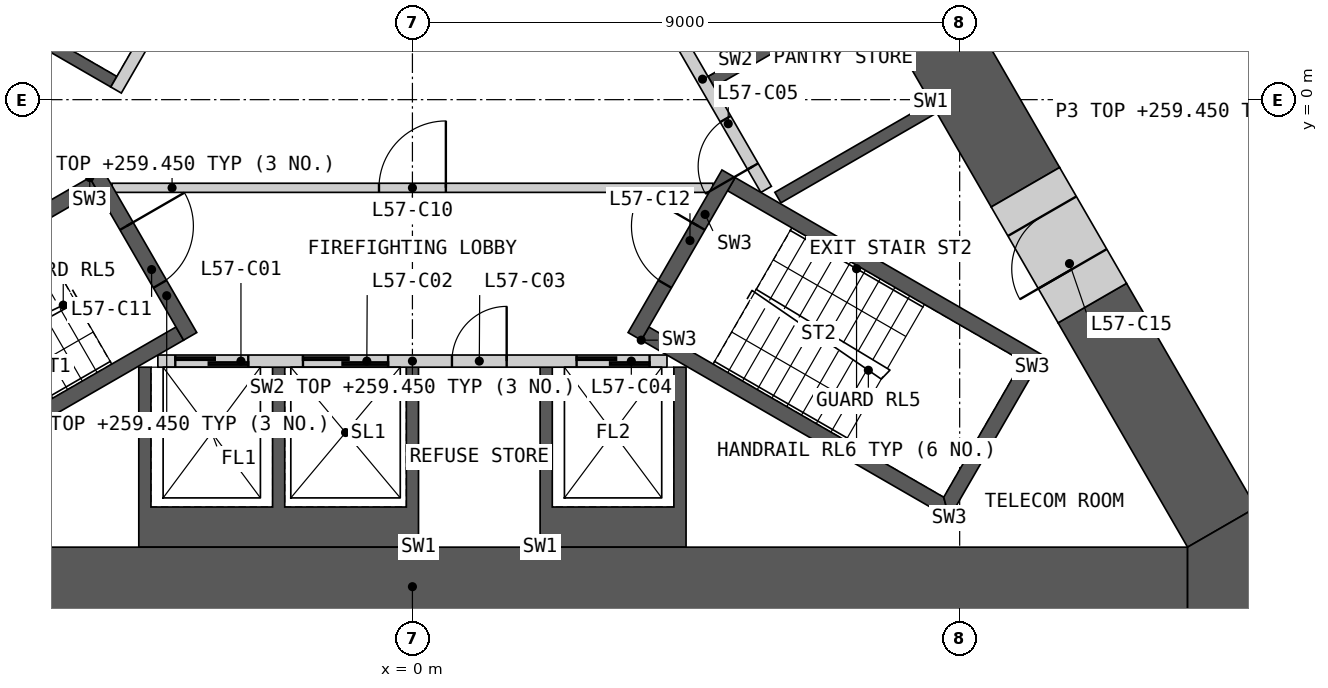
"""IFC4 building model, lengths in metres.
Left out: names, types, materials, properties, quantities, classifications, styles, units other than length and angle.
Written with IfcOpenShell. Run it as: python <this file> out.ifc"""

import sys

from ifc_helpers import new_model, si_unit, direction, frame, frame_2d, origin, place, context, subcontext, project, spatial, polyline, rectangle, outline, extrude, element, fill, save


model = new_model("IFC4")
c1 = context("Model", 3, precision=1e-05, world=origin(), true_north=direction((0.0, 1.0)))
c2 = subcontext(c1, "Body", "Model", "MODEL_VIEW")
j1 = project(units=[si_unit("LENGTHUNIT", "METRE"), si_unit("PLANEANGLEUNIT", "RADIAN")], contexts=[c1])
p1 = place(None, origin())
s1 = spatial("IfcSite", under=j1, at=p1, CompositionType="ELEMENT")
p2 = place(p1, origin())
s2 = spatial("IfcBuilding", under=s1, at=p2, CompositionType="ELEMENT")
p3 = place(p2, frame((0.0, 0.0, 256.2)))
s3 = spatial("IfcBuildingStorey", under=s2, at=p3, CompositionType="ELEMENT", Elevation=256.2)
p4 = place(p3, origin())
e1 = element("IfcWall", 1, at=p4, inside=s3, PredefinedType="SHEAR", context=c2, shape_type="SweptSolid", body=[
    extrude(outline(polyline([(0.1, -7.36), (-4.5, -7.36), (-4.5, -4.4), (-4.3, -4.4), (-4.3, -6.7), (-2.3, -6.7), (-2.3, -4.4), (-2.1, -4.4), (-2.1, -6.7), (-0.1, -6.7), (-0.1, -4.4), (0.1, -4.4), (0.1, -7.36)])), origin(), (0.0, 0.0, 1.0), 3.25),
])
p5 = place(p3, origin())
e2 = element("IfcWall", 2, at=p5, inside=s3, PredefinedType="SHEAR", context=c2, shape_type="SweptSolid", body=[
    extrude(outline(polyline([(2.1, -7.36), (2.1, -4.4), (2.3, -4.4), (2.3, -6.7), (4.3, -6.7), (4.3, -4.4), (4.5, -4.4), (4.5, -7.36), (2.1, -7.36)])), origin(), (0.0, 0.0, 1.0), 3.25),
])
p6 = place(p3, frame((-4.187, -4.3, 0.0), z_axis=(0.0, 0.0, 1.0), x_axis=(1.0, 0.0, 0.0)))
e3 = element("IfcWall", 3, at=p6, inside=s3, PredefinedType="SOLIDWALL", context=c2, shape_type="SweptSolid", body=[
    extrude(rectangle(XDim=8.373, YDim=0.2, at=frame_2d((4.187, 0.0))), origin(), (0.0, 0.0, 1.0), 3.25),
])
p7 = place(p6, frame((0.287, 0.0, 0.0)))
e4 = element("IfcOpeningElement", 4, at=p7, cuts=e3, PredefinedType="OPENING", context=c2, shape_type="SweptSolid", body=[
    extrude(rectangle(XDim=1.2, YDim=2.1, at=frame_2d((0.6, 1.05))), frame((0.0, 0.11, 0.0), z_axis=(0.0, -1.0, 0.0), x_axis=(1.0, 0.0, 0.0)), (0.0, 0.0, 1.0), 0.22),
])
p8 = place(p6, frame((2.387, 0.0, 0.0)))
e5 = element("IfcOpeningElement", 5, at=p8, cuts=e3, PredefinedType="OPENING", context=c2, shape_type="SweptSolid", body=[
    extrude(rectangle(XDim=1.4, YDim=2.1, at=frame_2d((0.7, 1.05))), frame((0.0, 0.11, 0.0), z_axis=(0.0, -1.0, 0.0), x_axis=(1.0, 0.0, 0.0)), (0.0, 0.0, 1.0), 0.22),
])
p9 = place(p6, frame((4.837, 0.0, 0.0)))
e6 = element("IfcOpeningElement", 6, at=p9, cuts=e3, PredefinedType="OPENING", context=c2, shape_type="SweptSolid", body=[
    extrude(rectangle(XDim=0.9, YDim=2.1, at=frame_2d((0.45, 1.05))), frame((0.0, 0.11, 0.0), z_axis=(0.0, -1.0, 0.0), x_axis=(1.0, 0.0, 0.0)), (0.0, 0.0, 1.0), 0.22),
])
p10 = place(p6, frame((6.887, 0.0, 0.0)))
e7 = element("IfcOpeningElement", 7, at=p10, cuts=e3, PredefinedType="OPENING", context=c2, shape_type="SweptSolid", body=[
    extrude(rectangle(XDim=1.2, YDim=2.1, at=frame_2d((0.6, 1.05))), frame((0.0, 0.11, 0.0), z_axis=(0.0, -1.0, 0.0), x_axis=(1.0, 0.0, 0.0)), (0.0, 0.0, 1.0), 0.22),
])
p11 = place(p3, origin())
e8 = element("IfcWall", 8, at=p11, inside=s3, PredefinedType="SHEAR", context=c2, shape_type="SweptSolid", body=[
    extrude(outline(polyline([(8.524, -0.044), (8.624, -0.217), (8.231, -0.444), (6.061, -1.697), (5.96, -1.524), (8.131, -0.271), (8.524, -0.044)])), origin(), (0.0, 0.0, 1.0), 3.25),
])
p12 = place(p3, origin())
e9 = element("IfcWall", 9, at=p12, inside=s3, PredefinedType="SHEAR", context=c2, shape_type="SweptSolid", body=[
    extrude(outline(polyline([(7.524, 1.688), (7.131, 1.461), (4.96, 0.208), (4.861, 0.381), (6.852, 1.531), (4.752, 5.169), (2.76, 4.019), (2.66, 4.192), (4.652, 5.342), (3.652, 7.074), (1.66, 5.924), (1.561, 6.097), (3.731, 7.35), (4.124, 7.577), (7.524, 1.688)])), origin(), (0.0, 0.0, 1.0), 3.25),
])
p13 = place(p3, frame((5.817, -1.476, 0.0), z_axis=(0.0, 0.0, 1.0), x_axis=(-0.500002616675, 0.866023893041, 0.0)))
e10 = element("IfcWall", 10, at=p13, inside=s3, PredefinedType="SOLIDWALL", context=c2, shape_type="SweptSolid", body=[
    extrude(rectangle(XDim=8.373, YDim=0.2, at=frame_2d((4.187, 0.0))), origin(), (0.0, 0.0, 1.0), 3.25),
])
p14 = place(p13, frame((0.437, 0.0, 0.0)))
e11 = element("IfcOpeningElement", 11, at=p14, cuts=e10, PredefinedType="OPENING", context=c2, shape_type="SweptSolid", body=[
    extrude(rectangle(XDim=0.9, YDim=2.1, at=frame_2d((0.45, 1.05))), frame((0.0, 0.11, 0.0), z_axis=(0.0, -1.0, 0.0), x_axis=(1.0, 0.0, 0.0)), (0.0, 0.0, 1.0), 0.22),
])
p15 = place(p13, frame((3.737, 0.0, 0.0)))
e12 = element("IfcOpeningElement", 12, at=p15, cuts=e10, PredefinedType="OPENING", context=c2, shape_type="SweptSolid", body=[
    extrude(rectangle(XDim=0.9, YDim=2.1, at=frame_2d((0.45, 1.05))), frame((0.0, 0.11, 0.0), z_axis=(0.0, -1.0, 0.0), x_axis=(1.0, 0.0, 0.0)), (0.0, 0.0, 1.0), 0.22),
])
p16 = place(p13, frame((6.937, 0.0, 0.0)))
e13 = element("IfcOpeningElement", 13, at=p16, cuts=e10, PredefinedType="OPENING", context=c2, shape_type="SweptSolid", body=[
    extrude(rectangle(XDim=1.1, YDim=2.1, at=frame_2d((0.55, 1.05))), frame((0.0, 0.11, 0.0), z_axis=(0.0, -1.0, 0.0), x_axis=(1.0, 0.0, 0.0)), (0.0, 0.0, 1.0), 0.22),
])
p17 = place(p3, origin())
e14 = element("IfcWall", 14, at=p17, inside=s3, PredefinedType="SHEAR", context=c2, shape_type="SweptSolid", body=[
    extrude(outline(polyline([(-7.524, 1.688), (-4.124, 7.577), (-3.731, 7.35), (-1.561, 6.097), (-1.66, 5.924), (-3.652, 7.074), (-4.652, 5.342), (-2.66, 4.192), (-2.76, 4.019), (-4.752, 5.169), (-5.752, 3.437), (-3.76, 2.287), (-3.861, 2.113), (-5.852, 3.263), (-6.852, 1.531), (-4.861, 0.381), (-4.96, 0.208), (-7.131, 1.461), (-7.524, 1.688)])), origin(), (0.0, 0.0, 1.0), 3.25),
])
p18 = place(p3, frame((-1.631, 5.776, 0.0), z_axis=(0.0, 0.0, 1.0), x_axis=(-0.499992876559, -0.866029516466, 0.0)))
e15 = element("IfcWall", 15, at=p18, inside=s3, PredefinedType="SOLIDWALL", context=c2, shape_type="SweptSolid", body=[
    extrude(rectangle(XDim=6.486, YDim=0.2, at=frame_2d((3.243, 0.0))), origin(), (0.0, 0.0, 1.0), 3.25),
])
p19 = place(p18, frame((0.337, 0.0, 0.0)))
e16 = element("IfcOpeningElement", 16, at=p19, cuts=e15, PredefinedType="OPENING", context=c2, shape_type="SweptSolid", body=[
    extrude(rectangle(XDim=1.1, YDim=2.1, at=frame_2d((0.55, 1.05))), frame((0.0, 0.11, 0.0), z_axis=(0.0, -1.0, 0.0), x_axis=(1.0, 0.0, 0.0)), (0.0, 0.0, 1.0), 0.22),
])
p20 = place(p18, frame((2.537, 0.0, 0.0)))
e17 = element("IfcOpeningElement", 17, at=p20, cuts=e15, PredefinedType="OPENING", context=c2, shape_type="SweptSolid", body=[
    extrude(rectangle(XDim=1.1, YDim=2.1, at=frame_2d((0.55, 1.05))), frame((0.0, 0.11, 0.0), z_axis=(0.0, -1.0, 0.0), x_axis=(1.0, 0.0, 0.0)), (0.0, 0.0, 1.0), 0.22),
])
p21 = place(p3, frame((-4.941, -1.45, 0.0), z_axis=(0.0, 0.0, 1.0), x_axis=(1.0, 0.0, 0.0)))
e18 = element("IfcWall", 18, at=p21, inside=s3, PredefinedType="PARTITIONING", context=c2, shape_type="SweptSolid", body=[
    extrude(rectangle(XDim=9.882, YDim=0.15, at=frame_2d((4.941, 0.0))), origin(), (0.0, 0.0, 1.0), 3.25),
])
p22 = place(p21, frame((4.391, 0.0, 0.0)))
e19 = element("IfcOpeningElement", 19, at=p22, cuts=e18, PredefinedType="OPENING", context=c2, shape_type="SweptSolid", body=[
    extrude(rectangle(XDim=1.1, YDim=2.1, at=frame_2d((0.55, 1.05))), frame((0.0, 0.085, 0.0), z_axis=(0.0, -1.0, 0.0), x_axis=(1.0, 0.0, 0.0)), (0.0, 0.0, 1.0), 0.17),
])
p23 = place(p3, origin())
e20 = element("IfcWall", 20, at=p23, inside=s3, PredefinedType="SHEAR", context=c2, shape_type="SweptSolid", body=[
    extrude(outline(polyline([(-5.307, -1.281), (-10.374, -4.206), (-10.032, -4.298), (-5.182, -1.498), (-5.307, -1.281)])), origin(), (0.0, 0.0, 1.0), 3.25),
])
p24 = place(p3, origin())
e21 = element("IfcWall", 21, at=p24, inside=s3, PredefinedType="SHEAR", context=c2, shape_type="SweptSolid", body=[
    extrude(outline(polyline([(-8.738, -6.539), (-8.83, -6.881), (-3.763, -3.956), (-3.888, -3.739), (-8.738, -6.539)])), origin(), (0.0, 0.0, 1.0), 3.25),
])
p25 = place(p3, frame((-5.199, -1.219, 0.0), z_axis=(0.0, 0.0, 1.0), x_axis=(0.499982516597, -0.866035497597, 0.0)))
e22 = element("IfcWall", 22, at=p25, inside=s3, PredefinedType="SHEAR", context=c2, shape_type="SweptSolid", body=[
    extrude(rectangle(XDim=3.088, YDim=0.25, at=frame_2d((1.544, 0.0))), origin(), (0.0, 0.0, 1.0), 3.25),
])
p26 = place(p25, frame((0.994, 0.0, 0.0)))
e23 = element("IfcOpeningElement", 23, at=p26, cuts=e22, PredefinedType="OPENING", context=c2, shape_type="SweptSolid", body=[
    extrude(rectangle(XDim=1.1, YDim=2.1, at=frame_2d((0.55, 1.05))), frame((0.0, 0.135, 0.0), z_axis=(0.0, -1.0, 0.0), x_axis=(1.0, 0.0, 0.0)), (0.0, 0.0, 1.0), 0.27),
])
p27 = place(p3, origin())
e24 = element("IfcWall", 24, at=p27, inside=s3, PredefinedType="SHEAR", context=c2, shape_type="SweptSolid", body=[
    extrude(outline(polyline([(3.763, -3.956), (8.83, -6.881), (8.738, -6.539), (3.888, -3.739), (3.763, -3.956)])), origin(), (0.0, 0.0, 1.0), 3.25),
])
p28 = place(p3, origin())
e25 = element("IfcWall", 25, at=p28, inside=s3, PredefinedType="SHEAR", context=c2, shape_type="SweptSolid", body=[
    extrude(outline(polyline([(8.83, -6.881), (10.374, -4.206), (10.032, -4.298), (8.738, -6.539), (8.83, -6.881)])), origin(), (0.0, 0.0, 1.0), 3.25),
])
p29 = place(p3, origin())
e26 = element("IfcWall", 26, at=p29, inside=s3, PredefinedType="SHEAR", context=c2, shape_type="SweptSolid", body=[
    extrude(outline(polyline([(10.032, -4.298), (10.374, -4.206), (5.307, -1.281), (5.182, -1.498), (10.032, -4.298)])), origin(), (0.0, 0.0, 1.0), 3.25),
])
p30 = place(p3, frame((3.655, -3.893, 0.0), z_axis=(0.0, 0.0, 1.0), x_axis=(0.499982516597, 0.866035497597, 0.0)))
e27 = element("IfcWall", 27, at=p30, inside=s3, PredefinedType="SHEAR", context=c2, shape_type="SweptSolid", body=[
    extrude(rectangle(XDim=3.088, YDim=0.25, at=frame_2d((1.544, 0.0))), origin(), (0.0, 0.0, 1.0), 3.25),
])
p31 = place(p30, frame((0.994, 0.0, 0.0)))
e28 = element("IfcOpeningElement", 28, at=p31, cuts=e27, PredefinedType="OPENING", context=c2, shape_type="SweptSolid", body=[
    extrude(rectangle(XDim=1.1, YDim=2.1, at=frame_2d((0.55, 1.05))), frame((0.0, 0.135, 0.0), z_axis=(0.0, -1.0, 0.0), x_axis=(1.0, 0.0, 0.0)), (0.0, 0.0, 1.0), 0.27),
])
p32 = place(p3, frame((-12.748, -8.01, 0.0), z_axis=(0.0, 0.0, 1.0), x_axis=(1.0, 0.0, 0.0)))
e29 = element("IfcWall", 29, at=p32, inside=s3, PredefinedType="SHEAR", context=c2, shape_type="SweptSolid", body=[
    extrude(rectangle(XDim=25.497, YDim=1.3, at=frame_2d((12.748, 0.0))), origin(), (0.0, 0.0, 1.0), 3.25),
])
p33 = place(p3, frame((10.081, -1.441, 0.0), z_axis=(0.0, 0.0, 1.0), x_axis=(-0.500006109471, 0.866021876451, 0.0)))
e30 = element("IfcWall", 30, at=p33, inside=s3, PredefinedType="SHEAR", context=c2, shape_type="SweptSolid", body=[
    extrude(rectangle(XDim=11.672, YDim=1.3, at=frame_2d((5.836, 0.0))), origin(), (0.0, 0.0, 1.0), 3.25),
])
p34 = place(p3, frame((13.311, -7.035, 0.0), z_axis=(0.0, 0.0, 1.0), x_axis=(-0.500003555838, 0.866023350811, 0.0)))
e31 = element("IfcWall", 31, at=p34, inside=s3, PredefinedType="SHEAR", context=c2, shape_type="SweptSolid", body=[
    extrude(rectangle(XDim=4.26, YDim=1.3, at=frame_2d((2.13, 0.0))), origin(), (0.0, 0.0, 1.0), 3.25),
])
p35 = place(p3, origin())
e32 = element("IfcWall", 32, at=p35, inside=s3, PredefinedType="SHEAR", context=c2, shape_type="SweptSolid", body=[
    extrude(outline(polyline([(12.748, -8.66), (12.748, -7.36), (13.874, -6.71), (15.0, -8.66), (12.748, -8.66)])), origin(), (0.0, 0.0, 1.0), 3.25),
])
p36 = place(p3, frame((11.181, -3.346, 0.0), z_axis=(0.0, 0.0, 1.0), x_axis=(-0.499946605688, 0.86605622881, 0.0)))
e33 = element("IfcWall", 33, at=p36, inside=s3, PredefinedType="SHEAR", context=c2, shape_type="SweptSolid", body=[
    extrude(rectangle(XDim=2.2, YDim=1.3, at=frame_2d((1.1, 0.0))), origin(), (0.0, 0.0, 1.0), 3.25),
])
p37 = place(p36, frame((0.65, 0.0, 0.0)))
e34 = element("IfcOpeningElement", 34, at=p37, cuts=e33, PredefinedType="OPENING", context=c2, shape_type="SweptSolid", body=[
    extrude(rectangle(XDim=1.0, YDim=2.1, at=frame_2d((0.5, 1.05))), frame((0.0, 0.66, 0.0), z_axis=(0.0, -1.0, 0.0), x_axis=(1.0, 0.0, 0.0)), (0.0, 0.0, 1.0), 1.32),
])
p38 = place(p3, frame((5.377, 18.807, 0.0), z_axis=(0.0, 0.0, 1.0), x_axis=(0.499999852422, -0.866025488988, 0.0)))
e35 = element("IfcWall", 35, at=p38, inside=s3, PredefinedType="PARTITIONING", context=c2, shape_type="SweptSolid", body=[
    extrude(rectangle(XDim=27.198, YDim=0.2, at=frame_2d((13.599, 0.0))), origin(), (0.0, 0.0, 1.0), 3.25),
])
p39 = place(p38, frame((25.096, 0.0, 0.0)))
e36 = element("IfcOpeningElement", 36, at=p39, cuts=e35, PredefinedType="OPENING", context=c2, shape_type="SweptSolid", body=[
    extrude(rectangle(XDim=0.95, YDim=2.1, at=frame_2d((0.475, 1.05))), frame((0.0, 0.11, 0.0), z_axis=(0.0, -1.0, 0.0), x_axis=(1.0, 0.0, 0.0)), (0.0, 0.0, 1.0), 0.22),
])
p40 = place(p38, frame((19.122, 0.0, 0.0)))
e37 = element("IfcOpeningElement", 37, at=p40, cuts=e35, PredefinedType="OPENING", context=c2, shape_type="SweptSolid", body=[
    extrude(rectangle(XDim=1.0, YDim=2.1, at=frame_2d((0.5, 1.05))), frame((0.0, 0.11, 0.0), z_axis=(0.0, -1.0, 0.0), x_axis=(1.0, 0.0, 0.0)), (0.0, 0.0, 1.0), 0.22),
])
p41 = place(p38, frame((17.115, 0.0, 0.0)))
e38 = element("IfcOpeningElement", 38, at=p41, cuts=e35, PredefinedType="OPENING", context=c2, shape_type="SweptSolid", body=[
    extrude(rectangle(XDim=1.1, YDim=2.1, at=frame_2d((0.55, 1.05))), frame((0.0, 0.11, 0.0), z_axis=(0.0, -1.0, 0.0), x_axis=(1.0, 0.0, 0.0)), (0.0, 0.0, 1.0), 0.22),
])
p42 = place(p38, frame((0.35, 0.0, 0.0)))
e39 = element("IfcOpeningElement", 39, at=p42, cuts=e35, PredefinedType="OPENING", context=c2, shape_type="SweptSolid", body=[
    extrude(rectangle(XDim=1.1, YDim=2.1, at=frame_2d((0.55, 1.05))), frame((0.0, 0.11, 0.0), z_axis=(0.0, -1.0, 0.0), x_axis=(1.0, 0.0, 0.0)), (0.0, 0.0, 1.0), 0.22),
])
p43 = place(p7, origin())
e40 = element("IfcDoor", 40, at=p43, inside=s3, OperationType="SLIDING_TO_LEFT", PredefinedType="DOOR", context=c2, shape_type="SweptSolid", body=[
    extrude(rectangle(XDim=1.2, YDim=2.1, at=frame_2d((0.6, 1.05))), frame((0.0, 0.025, 0.0), z_axis=(0.0, -1.0, 0.0), x_axis=(1.0, 0.0, 0.0)), (0.0, 0.0, 1.0), 0.05),
])
fill(e4, e40)
p44 = place(p8, origin())
e41 = element("IfcDoor", 41, at=p44, inside=s3, OperationType="SLIDING_TO_LEFT", PredefinedType="DOOR", context=c2, shape_type="SweptSolid", body=[
    extrude(rectangle(XDim=1.4, YDim=2.1, at=frame_2d((0.7, 1.05))), frame((0.0, 0.025, 0.0), z_axis=(0.0, -1.0, 0.0), x_axis=(1.0, 0.0, 0.0)), (0.0, 0.0, 1.0), 0.05),
])
fill(e5, e41)
p45 = place(p9, origin())
e42 = element("IfcDoor", 42, at=p45, inside=s3, OperationType="SINGLE_SWING_RIGHT", PredefinedType="DOOR", context=c2, shape_type="SweptSolid", body=[
    extrude(rectangle(XDim=0.9, YDim=2.1, at=frame_2d((0.45, 1.05))), frame((0.0, 0.025, 0.0), z_axis=(0.0, -1.0, 0.0), x_axis=(1.0, 0.0, 0.0)), (0.0, 0.0, 1.0), 0.05),
])
fill(e6, e42)
p46 = place(p10, origin())
e43 = element("IfcDoor", 43, at=p46, inside=s3, OperationType="SLIDING_TO_LEFT", PredefinedType="DOOR", context=c2, shape_type="SweptSolid", body=[
    extrude(rectangle(XDim=1.2, YDim=2.1, at=frame_2d((0.6, 1.05))), frame((0.0, 0.025, 0.0), z_axis=(0.0, -1.0, 0.0), x_axis=(1.0, 0.0, 0.0)), (0.0, 0.0, 1.0), 0.05),
])
fill(e7, e43)
p47 = place(p14, origin())
e44 = element("IfcDoor", 44, at=p47, inside=s3, OperationType="SINGLE_SWING_LEFT", PredefinedType="DOOR", context=c2, shape_type="SweptSolid", body=[
    extrude(rectangle(XDim=0.9, YDim=2.1, at=frame_2d((0.45, 1.05))), frame((0.0, 0.025, 0.0), z_axis=(0.0, -1.0, 0.0), x_axis=(1.0, 0.0, 0.0)), (0.0, 0.0, 1.0), 0.05),
])
fill(e11, e44)
p48 = place(p22, origin())
e45 = element("IfcDoor", 45, at=p48, inside=s3, OperationType="SINGLE_SWING_RIGHT", PredefinedType="DOOR", context=c2, shape_type="SweptSolid", body=[
    extrude(rectangle(XDim=1.1, YDim=2.1, at=frame_2d((0.55, 1.05))), frame((0.0, 0.025, 0.0), z_axis=(0.0, -1.0, 0.0), x_axis=(1.0, 0.0, 0.0)), (0.0, 0.0, 1.0), 0.05),
])
fill(e19, e45)
p49 = place(p26, origin())
e46 = element("IfcDoor", 46, at=p49, inside=s3, OperationType="SINGLE_SWING_LEFT", PredefinedType="DOOR", context=c2, shape_type="SweptSolid", body=[
    extrude(rectangle(XDim=1.1, YDim=2.1, at=frame_2d((0.55, 1.05))), frame((0.0, 0.025, 0.0), z_axis=(0.0, -1.0, 0.0), x_axis=(1.0, 0.0, 0.0)), (0.0, 0.0, 1.0), 0.05),
])
fill(e23, e46)
p50 = place(p31, origin())
e47 = element("IfcDoor", 47, at=p50, inside=s3, OperationType="SINGLE_SWING_RIGHT", PredefinedType="DOOR", context=c2, shape_type="SweptSolid", body=[
    extrude(rectangle(XDim=1.1, YDim=2.1, at=frame_2d((0.55, 1.05))), frame((0.0, 0.025, 0.0), z_axis=(0.0, -1.0, 0.0), x_axis=(1.0, 0.0, 0.0)), (0.0, 0.0, 1.0), 0.05),
])
fill(e28, e47)
p51 = place(p37, origin())
e48 = element("IfcDoor", 48, at=p51, inside=s3, OperationType="SINGLE_SWING_LEFT", PredefinedType="DOOR", context=c2, shape_type="SweptSolid", body=[
    extrude(rectangle(XDim=1.0, YDim=2.1, at=frame_2d((0.5, 1.05))), frame((0.0, 0.405, 0.0), z_axis=(0.0, -1.0, 0.0), x_axis=(1.0, 0.0, 0.0)), (0.0, 0.0, 1.0), 0.05),
])
fill(e34, e48)
save(model, sys.argv[1])
